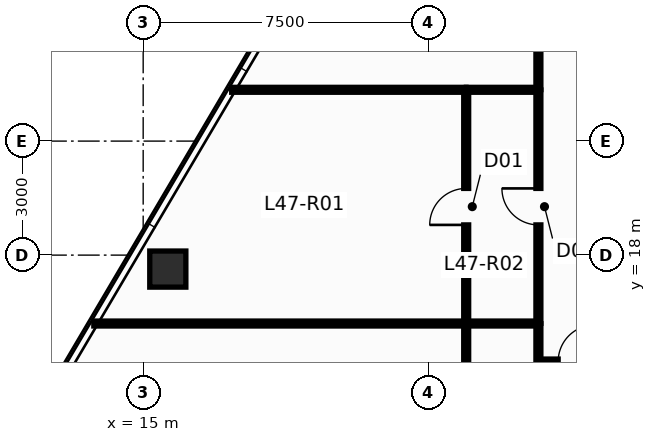
"""IFC4 building model, lengths in metres.
Left out: names, types, materials, properties, quantities, classifications, styles, units other than length and angle.
Written with IfcOpenShell. Run it as: python <this file> out.ifc"""

import sys

from ifc_helpers import new_model, si_unit, direction, frame, frame_2d, origin, origin_2d, place, context, subcontext, project, spatial, rectangle, hollow_rectangle, extrude, source, transform, mapped, element, fill, save


model = new_model("IFC4")
c1 = context("Model", 3, precision=1e-05, world=origin(), true_north=direction((0.0, 1.0)))
c2 = subcontext(c1, "Body", "Model", "MODEL_VIEW")
j1 = project(units=[si_unit("LENGTHUNIT", "METRE"), si_unit("PLANEANGLEUNIT", "RADIAN")], contexts=[c1])
p1 = place(None, origin())
s1 = spatial("IfcSite", under=j1, at=p1, CompositionType="ELEMENT")
p2 = place(p1, origin())
s2 = spatial("IfcBuilding", under=s1, at=p2, CompositionType="ELEMENT")
p3 = place(p2, frame((0.0, 0.0, 180.4)))
s3 = spatial("IfcBuildingStorey", under=s2, at=p3, CompositionType="ELEMENT", Elevation=180.4)
m1 = source(origin(), c2, "Body", "SweptSolid", [
    extrude(hollow_rectangle(XDim=0.95, YDim=0.95, WallThickness=0.05, at=origin_2d()), origin(), (0.0, 0.0, 1.0), 3.651),
])
p4 = place(p3, frame((15.648, 17.633, 0.0), z_axis=(0.010431083049, -0.021597691184, 0.999712324742), x_axis=(0.900476348161, 0.434904985489, 0.0)))
e1 = element("IfcColumn", 1, at=p4, inside=s3, PredefinedType="COLUMN", context=c2, shape_type="MappedRepresentation", body=[
    mapped(m1, transform((0.0, 0.0, 0.0), scale=1.0)),
])
p5 = place(p3, frame((13.701, 16.2, 0.0), z_axis=(0.0, 0.0, 1.0), x_axis=(1.0, 0.0, 0.0)))
e2 = element("IfcWall", 2, at=p5, inside=s3, PredefinedType="PARTITIONING", context=c2, shape_type="SweptSolid", body=[
    extrude(rectangle(XDim=9.794, YDim=0.13, at=frame_2d((4.897, 0.0))), origin(), (0.0, 0.0, 1.0), 3.4),
])
p6 = place(p3, frame((25.4, 30.095, 0.0), z_axis=(0.0, 0.0, 1.0), x_axis=(0.0, -1.0, 0.0)))
e3 = element("IfcWall", 3, at=p6, inside=s3, PredefinedType="PARTITIONING", context=c2, shape_type="SweptSolid", body=[
    extrude(rectangle(XDim=7.74, YDim=0.13, at=frame_2d((3.87, 0.0))), origin(), (0.0, 0.0, 1.0), 3.078),
])
p7 = place(p6, frame((3.39, 0.0, 0.0)))
e4 = element("IfcOpeningElement", 4, at=p7, cuts=e3, PredefinedType="OPENING", context=c2, shape_type="SweptSolid", body=[
    extrude(rectangle(XDim=0.96, YDim=2.15, at=frame_2d((0.48, 1.075))), frame((0.0, 0.077, 0.0), z_axis=(0.0, -1.0, 0.0), x_axis=(1.0, 0.0, 0.0)), (0.0, 0.0, 1.0), 0.154),
])
p8 = place(p3, frame((17.329, 22.35, 0.0), z_axis=(0.0, 0.0, 1.0), x_axis=(1.0, 0.0, 0.0)))
e5 = element("IfcWall", 5, at=p8, inside=s3, PredefinedType="PARTITIONING", context=c2, shape_type="SweptSolid", body=[
    extrude(rectangle(XDim=6.166, YDim=0.13, at=frame_2d((3.083, 0.0))), origin(), (0.0, 0.0, 1.0), 3.4),
])
p9 = place(p3, frame((25.4, 16.205, 0.0), z_axis=(0.0, 0.0, 1.0), x_axis=(0.0, 1.0, 0.0)))
e6 = element("IfcWall", 6, at=p9, inside=s3, PredefinedType="PARTITIONING", context=c2, shape_type="SweptSolid", body=[
    extrude(rectangle(XDim=6.14, YDim=0.13, at=frame_2d((3.07, 0.0))), origin(), (0.0, 0.0, 1.0), 3.078),
])
p10 = place(p9, frame((2.59, 0.0, 0.0)))
e7 = element("IfcOpeningElement", 7, at=p10, cuts=e6, PredefinedType="OPENING", context=c2, shape_type="SweptSolid", body=[
    extrude(rectangle(XDim=0.96, YDim=2.15, at=frame_2d((0.48, 1.075))), frame((0.0, 0.077, 0.0), z_axis=(0.0, -1.0, 0.0), x_axis=(1.0, 0.0, 0.0)), (0.0, 0.0, 1.0), 0.154),
])
p11 = place(p3, frame((23.5, 16.205, 0.0), z_axis=(0.0, 0.0, 1.0), x_axis=(0.0, 1.0, 0.0)))
e8 = element("IfcWall", 8, at=p11, inside=s3, PredefinedType="PARTITIONING", context=c2, shape_type="SweptSolid", body=[
    extrude(rectangle(XDim=6.14, YDim=0.13, at=frame_2d((3.07, 0.0))), origin(), (0.0, 0.0, 1.0), 3.078),
])
p12 = place(p11, frame((2.59, 0.0, 0.0)))
e9 = element("IfcOpeningElement", 9, at=p12, cuts=e8, PredefinedType="OPENING", context=c2, shape_type="SweptSolid", body=[
    extrude(rectangle(XDim=0.96, YDim=2.15, at=frame_2d((0.48, 1.075))), frame((0.0, 0.077, 0.0), z_axis=(0.0, -1.0, 0.0), x_axis=(1.0, 0.0, 0.0)), (0.0, 0.0, 1.0), 0.154),
])
p13 = place(p3, frame((23.5, 11.255, 0.0), z_axis=(0.0, 0.0, 1.0), x_axis=(0.0, 1.0, 0.0)))
e10 = element("IfcWall", 10, at=p13, inside=s3, PredefinedType="PARTITIONING", context=c2, shape_type="SweptSolid", body=[
    extrude(rectangle(XDim=4.94, YDim=0.13, at=frame_2d((2.47, 0.0))), origin(), (0.0, 0.0, 1.0), 3.4),
])
p14 = place(p13, frame((1.99, 0.0, 0.0)))
e11 = element("IfcOpeningElement", 11, at=p14, cuts=e10, PredefinedType="OPENING", context=c2, shape_type="SweptSolid", body=[
    extrude(rectangle(XDim=0.96, YDim=2.15, at=frame_2d((0.48, 1.075))), frame((0.0, 0.077, 0.0), z_axis=(0.0, -1.0, 0.0), x_axis=(1.0, 0.0, 0.0)), (0.0, 0.0, 1.0), 0.154),
])
p15 = place(p3, frame((25.405, 15.2, 0.0), z_axis=(0.0, 0.0, 1.0), x_axis=(1.0, 0.0, 0.0)))
e12 = element("IfcWall", 12, at=p15, inside=s3, PredefinedType="PARTITIONING", context=c2, shape_type="SweptSolid", body=[
    extrude(rectangle(XDim=1.99, YDim=0.13, at=frame_2d((0.995, 0.0))), origin(), (0.0, 0.0, 1.0), 3.4),
])
p16 = place(p15, frame((0.515, 0.0, 0.0)))
e13 = element("IfcOpeningElement", 13, at=p16, cuts=e12, PredefinedType="OPENING", context=c2, shape_type="SweptSolid", body=[
    extrude(rectangle(XDim=0.96, YDim=2.15, at=frame_2d((0.48, 1.075))), frame((0.0, 0.077, 0.0), z_axis=(0.0, -1.0, 0.0), x_axis=(1.0, 0.0, 0.0)), (0.0, 0.0, 1.0), 0.154),
])
for number, where, z_axis, x_axis in (
    (14, (23.505, 16.2, 0.0), (0.0, 0.0, 1.0), (1.0, 0.0, 0.0)),
    (15, (23.505, 22.35, 0.0), (0.0, 0.0, 1.0), (1.0, 0.0, 0.0)),
):
    element("IfcWall", number, at=place(p3, frame(where, z_axis=z_axis, x_axis=x_axis)), inside=s3, PredefinedType="PARTITIONING", context=c2, shape_type="SweptSolid", body=[
        extrude(rectangle(XDim=1.89, YDim=0.13, at=frame_2d((0.945, 0.0))), origin(), (0.0, 0.0, 1.0), 3.4),
    ])
p17 = place(p3, frame((25.4, 16.195, 0.0), z_axis=(0.0, 0.0, 1.0), x_axis=(0.0, -1.0, 0.0)))
e16 = element("IfcWall", 16, at=p17, inside=s3, PredefinedType="PARTITIONING", context=c2, shape_type="SweptSolid", body=[
    extrude(rectangle(XDim=0.99, YDim=0.13, at=frame_2d((0.495, 0.0))), origin(), (0.0, 0.0, 1.0), 3.4),
])
p18 = place(p10, origin())
e17 = element("IfcDoor", 17, at=p18, inside=s3, OperationType="SINGLE_SWING_RIGHT", PredefinedType="DOOR", context=c2, shape_type="SweptSolid", body=[
    extrude(rectangle(XDim=0.96, YDim=2.15, at=frame_2d((0.48, 1.075))), frame((0.0, 0.025, 0.0), z_axis=(0.0, -1.0, 0.0), x_axis=(1.0, 0.0, 0.0)), (0.0, 0.0, 1.0), 0.05),
])
fill(e7, e17)
p19 = place(p12, origin())
e18 = element("IfcDoor", 18, at=p19, inside=s3, OperationType="SINGLE_SWING_LEFT", PredefinedType="DOOR", context=c2, shape_type="SweptSolid", body=[
    extrude(rectangle(XDim=0.96, YDim=2.15, at=frame_2d((0.48, 1.075))), frame((0.0, 0.025, 0.0), z_axis=(0.0, -1.0, 0.0), x_axis=(1.0, 0.0, 0.0)), (0.0, 0.0, 1.0), 0.05),
])
fill(e9, e18)
p20 = place(p16, origin())
e19 = element("IfcDoor", 19, at=p20, inside=s3, OperationType="SINGLE_SWING_RIGHT", PredefinedType="DOOR", context=c2, shape_type="SweptSolid", body=[
    extrude(rectangle(XDim=0.96, YDim=2.15, at=frame_2d((0.48, 1.075))), frame((0.0, 0.025, 0.0), z_axis=(0.0, -1.0, 0.0), x_axis=(1.0, 0.0, 0.0)), (0.0, 0.0, 1.0), 0.05),
])
fill(e13, e19)
save(model, sys.argv[1])
